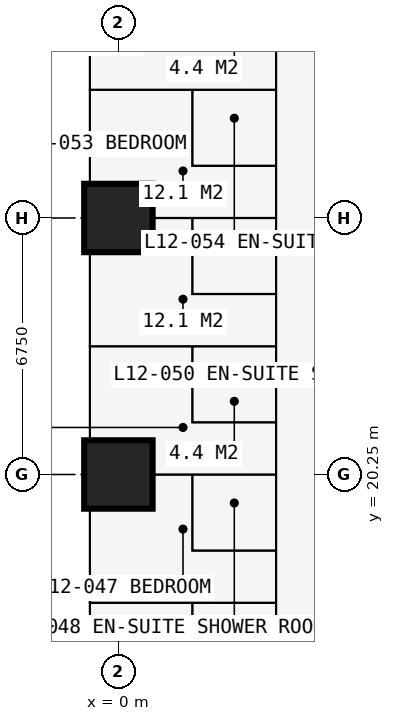
"""IFC4 building model, lengths in metres.
Left out: names, types, materials, properties, quantities, classifications, styles, units other than length and angle.
Written with IfcOpenShell. Run it as: python <this file> out.ifc"""

import sys

from ifc_helpers import new_model, si_unit, direction, frame, frame_2d, origin, origin_2d, place, context, subcontext, project, spatial, rectangle, extrude, element, fill, save


model = new_model("IFC4")
c1 = context("Model", 3, precision=1e-05, world=origin(), true_north=direction((0.0, 1.0)))
c2 = subcontext(c1, "Body", "Model", "MODEL_VIEW")
j1 = project(units=[si_unit("LENGTHUNIT", "METRE"), si_unit("PLANEANGLEUNIT", "RADIAN")], contexts=[c1])
p1 = place(None, origin())
s1 = spatial("IfcSite", under=j1, at=p1, CompositionType="ELEMENT")
p2 = place(p1, origin())
s2 = spatial("IfcBuilding", under=s1, at=p2, CompositionType="ELEMENT")
p3 = place(p2, frame((0.0, 0.0, 46.8)))
s3 = spatial("IfcBuildingStorey", under=s2, at=p3, CompositionType="ELEMENT", Elevation=46.8)
for number, where, z_axis, x_axis in (
    (1, (0.0, 20.25, 0.0), (0.0, 0.0, 1.0), (1.0, 0.0, 0.0)),
    (2, (0.0, 27.0, 0.0), (0.0, 0.0, 1.0), (1.0, 0.0, 0.0)),
):
    element("IfcColumn", number, at=place(p3, frame(where, z_axis=z_axis, x_axis=x_axis)), inside=s3, PredefinedType="COLUMN", context=c2, shape_type="SweptSolid", body=[
        extrude(rectangle(XDim=1.8, YDim=1.8, at=origin_2d()), origin(), (0.0, 0.0, 1.0), 3.6),
    ])
p4 = place(p3, frame((-0.75, 13.5, 0.0), z_axis=(0.0, 0.0, 1.0), x_axis=(0.0, 1.0, 0.0)))
e3 = element("IfcWall", 3, at=p4, inside=s3, PredefinedType="SOLIDWALL", context=c2, shape_type="SweptSolid", body=[
    extrude(rectangle(XDim=6.75, YDim=0.15, at=frame_2d((3.375, 0.0))), origin(), (0.0, 0.0, 1.0), 3.375),
])
p5 = place(p4, frame((0.962, 0.0, 0.0)))
e4 = element("IfcOpeningElement", 4, at=p5, cuts=e3, PredefinedType="OPENING", context=c2, shape_type="SweptSolid", body=[
    extrude(rectangle(XDim=1.0, YDim=2.2, at=frame_2d((0.5, 1.1))), frame((0.0, 0.085, 0.0), z_axis=(0.0, -1.0, 0.0), x_axis=(1.0, 0.0, 0.0)), (0.0, 0.0, 1.0), 0.17),
])
p6 = place(p4, frame((2.025, 0.0, 0.9)))
e5 = element("IfcOpeningElement", 5, at=p6, cuts=e3, PredefinedType="OPENING", context=c2, shape_type="SweptSolid", body=[
    extrude(rectangle(XDim=1.2, YDim=1.8, at=frame_2d((0.6, 0.9))), frame((0.0, 0.085, 0.0), z_axis=(0.0, -1.0, 0.0), x_axis=(1.0, 0.0, 0.0)), (0.0, 0.0, 1.0), 0.17),
])
p7 = place(p4, frame((4.788, 0.0, 0.0)))
e6 = element("IfcOpeningElement", 6, at=p7, cuts=e3, PredefinedType="OPENING", context=c2, shape_type="SweptSolid", body=[
    extrude(rectangle(XDim=1.0, YDim=2.2, at=frame_2d((0.5, 1.1))), frame((0.0, 0.085, 0.0), z_axis=(0.0, -1.0, 0.0), x_axis=(1.0, 0.0, 0.0)), (0.0, 0.0, 1.0), 0.17),
])
p8 = place(p4, frame((3.525, 0.0, 0.9)))
e7 = element("IfcOpeningElement", 7, at=p8, cuts=e3, PredefinedType="OPENING", context=c2, shape_type="SweptSolid", body=[
    extrude(rectangle(XDim=1.2, YDim=1.8, at=frame_2d((0.6, 0.9))), frame((0.0, 0.085, 0.0), z_axis=(0.0, -1.0, 0.0), x_axis=(1.0, 0.0, 0.0)), (0.0, 0.0, 1.0), 0.17),
])
p9 = place(p3, frame((-0.75, 20.25, 0.0), z_axis=(0.0, 0.0, 1.0), x_axis=(0.0, 1.0, 0.0)))
e8 = element("IfcWall", 8, at=p9, inside=s3, PredefinedType="SOLIDWALL", context=c2, shape_type="SweptSolid", body=[
    extrude(rectangle(XDim=6.75, YDim=0.15, at=frame_2d((3.375, 0.0))), origin(), (0.0, 0.0, 1.0), 3.375),
])
p10 = place(p9, frame((0.962, 0.0, 0.0)))
e9 = element("IfcOpeningElement", 9, at=p10, cuts=e8, PredefinedType="OPENING", context=c2, shape_type="SweptSolid", body=[
    extrude(rectangle(XDim=1.0, YDim=2.2, at=frame_2d((0.5, 1.1))), frame((0.0, 0.085, 0.0), z_axis=(0.0, -1.0, 0.0), x_axis=(1.0, 0.0, 0.0)), (0.0, 0.0, 1.0), 0.17),
])
p11 = place(p9, frame((2.025, 0.0, 0.9)))
e10 = element("IfcOpeningElement", 10, at=p11, cuts=e8, PredefinedType="OPENING", context=c2, shape_type="SweptSolid", body=[
    extrude(rectangle(XDim=1.2, YDim=1.8, at=frame_2d((0.6, 0.9))), frame((0.0, 0.085, 0.0), z_axis=(0.0, -1.0, 0.0), x_axis=(1.0, 0.0, 0.0)), (0.0, 0.0, 1.0), 0.17),
])
p12 = place(p9, frame((4.788, 0.0, 0.0)))
e11 = element("IfcOpeningElement", 11, at=p12, cuts=e8, PredefinedType="OPENING", context=c2, shape_type="SweptSolid", body=[
    extrude(rectangle(XDim=1.0, YDim=2.2, at=frame_2d((0.5, 1.1))), frame((0.0, 0.085, 0.0), z_axis=(0.0, -1.0, 0.0), x_axis=(1.0, 0.0, 0.0)), (0.0, 0.0, 1.0), 0.17),
])
p13 = place(p9, frame((3.525, 0.0, 0.9)))
e12 = element("IfcOpeningElement", 12, at=p13, cuts=e8, PredefinedType="OPENING", context=c2, shape_type="SweptSolid", body=[
    extrude(rectangle(XDim=1.2, YDim=1.8, at=frame_2d((0.6, 0.9))), frame((0.0, 0.085, 0.0), z_axis=(0.0, -1.0, 0.0), x_axis=(1.0, 0.0, 0.0)), (0.0, 0.0, 1.0), 0.17),
])
for number, where, z_axis, x_axis in (
    (13, (-0.85, 16.875, 0.0), (0.0, 0.0, 1.0), (-1.0, 0.0, 0.0)),
    (14, (-0.85, 23.625, 0.0), (0.0, 0.0, 1.0), (-1.0, 0.0, 0.0)),
):
    element("IfcWall", number, at=place(p3, frame(where, z_axis=z_axis, x_axis=x_axis)), inside=s3, PredefinedType="USERDEFINED", context=c2, shape_type="SweptSolid", body=[
        extrude(rectangle(XDim=2.2, YDim=1.0, at=frame_2d((1.1, 0.0))), origin(), (0.0, 0.0, 1.0), 0.9),
    ])
p14 = place(p3, frame((-0.734, 16.875, 0.0), z_axis=(0.0, 0.0, 1.0), x_axis=(1.0, 0.0, 0.0)))
e15 = element("IfcWall", 15, at=p14, inside=s3, PredefinedType="PARTITIONING", context=c2, shape_type="SweptSolid", body=[
    extrude(rectangle(XDim=4.884, YDim=0.175, at=frame_2d((2.442, 0.0))), origin(), (0.0, 0.0, 1.0), 3.375),
])
p15 = place(p3, frame((-0.734, 20.25, 0.0), z_axis=(0.0, 0.0, 1.0), x_axis=(1.0, 0.0, 0.0)))
e16 = element("IfcWall", 16, at=p15, inside=s3, PredefinedType="PARTITIONING", context=c2, shape_type="SweptSolid", body=[
    extrude(rectangle(XDim=4.884, YDim=0.175, at=frame_2d((2.442, 0.0))), origin(), (0.0, 0.0, 1.0), 2.61),
])
p16 = place(p3, frame((-0.734, 23.625, 0.0), z_axis=(0.0, 0.0, 1.0), x_axis=(1.0, 0.0, 0.0)))
e17 = element("IfcWall", 17, at=p16, inside=s3, PredefinedType="PARTITIONING", context=c2, shape_type="SweptSolid", body=[
    extrude(rectangle(XDim=4.884, YDim=0.175, at=frame_2d((2.442, 0.0))), origin(), (0.0, 0.0, 1.0), 3.375),
])
p17 = place(p3, frame((-0.734, 27.0, 0.0), z_axis=(0.0, 0.0, 1.0), x_axis=(1.0, 0.0, 0.0)))
e18 = element("IfcWall", 18, at=p17, inside=s3, PredefinedType="PARTITIONING", context=c2, shape_type="SweptSolid", body=[
    extrude(rectangle(XDim=4.884, YDim=0.175, at=frame_2d((2.442, 0.0))), origin(), (0.0, 0.0, 1.0), 2.61),
])
p18 = place(p3, frame((-0.734, 30.375, 0.0), z_axis=(0.0, 0.0, 1.0), x_axis=(1.0, 0.0, 0.0)))
e19 = element("IfcWall", 19, at=p18, inside=s3, PredefinedType="PARTITIONING", context=c2, shape_type="SweptSolid", body=[
    extrude(rectangle(XDim=4.884, YDim=0.175, at=frame_2d((2.442, 0.0))), origin(), (0.0, 0.0, 1.0), 3.375),
])
for number, where, z_axis, x_axis in (
    (20, (1.95, 14.875, 0.0), (0.0, 0.0, 1.0), (0.0, 1.0, 0.0)),
    (21, (1.95, 18.25, 0.0), (0.0, 0.0, 1.0), (0.0, 1.0, 0.0)),
):
    element("IfcWall", number, at=place(p3, frame(where, z_axis=z_axis, x_axis=x_axis)), inside=s3, PredefinedType="PARTITIONING", context=c2, shape_type="SweptSolid", body=[
        extrude(rectangle(XDim=2.0, YDim=0.1, at=frame_2d((1.0, 0.0))), origin(), (0.0, 0.0, 1.0), 3.375),
    ])
p19 = place(p3, frame((1.95, 18.25, 0.0), z_axis=(0.0, 0.0, 1.0), x_axis=(1.0, 0.0, 0.0)))
e22 = element("IfcWall", 22, at=p19, inside=s3, PredefinedType="PARTITIONING", context=c2, shape_type="SweptSolid", body=[
    extrude(rectangle(XDim=2.2, YDim=0.1, at=frame_2d((1.1, 0.0))), origin(), (0.0, 0.0, 1.0), 3.375),
])
p20 = place(p19, frame((0.65, 0.0, 0.0)))
e23 = element("IfcOpeningElement", 23, at=p20, cuts=e22, PredefinedType="OPENING", context=c2, shape_type="SweptSolid", body=[
    extrude(rectangle(XDim=0.9, YDim=2.2, at=frame_2d((0.45, 1.1))), frame((0.0, 0.06, 0.0), z_axis=(0.0, -1.0, 0.0), x_axis=(1.0, 0.0, 0.0)), (0.0, 0.0, 1.0), 0.12),
])
p21 = place(p3, frame((1.95, 21.625, 0.0), z_axis=(0.0, 0.0, 1.0), x_axis=(0.0, 1.0, 0.0)))
e24 = element("IfcWall", 24, at=p21, inside=s3, PredefinedType="PARTITIONING", context=c2, shape_type="SweptSolid", body=[
    extrude(rectangle(XDim=2.0, YDim=0.1, at=frame_2d((1.0, 0.0))), origin(), (0.0, 0.0, 1.0), 3.375),
])
p22 = place(p3, frame((1.95, 21.625, 0.0), z_axis=(0.0, 0.0, 1.0), x_axis=(1.0, 0.0, 0.0)))
e25 = element("IfcWall", 25, at=p22, inside=s3, PredefinedType="PARTITIONING", context=c2, shape_type="SweptSolid", body=[
    extrude(rectangle(XDim=2.2, YDim=0.1, at=frame_2d((1.1, 0.0))), origin(), (0.0, 0.0, 1.0), 3.375),
])
p23 = place(p22, frame((0.65, 0.0, 0.0)))
e26 = element("IfcOpeningElement", 26, at=p23, cuts=e25, PredefinedType="OPENING", context=c2, shape_type="SweptSolid", body=[
    extrude(rectangle(XDim=0.9, YDim=2.2, at=frame_2d((0.45, 1.1))), frame((0.0, 0.06, 0.0), z_axis=(0.0, -1.0, 0.0), x_axis=(1.0, 0.0, 0.0)), (0.0, 0.0, 1.0), 0.12),
])
p24 = place(p3, frame((1.95, 25.0, 0.0), z_axis=(0.0, 0.0, 1.0), x_axis=(0.0, 1.0, 0.0)))
e27 = element("IfcWall", 27, at=p24, inside=s3, PredefinedType="PARTITIONING", context=c2, shape_type="SweptSolid", body=[
    extrude(rectangle(XDim=2.0, YDim=0.1, at=frame_2d((1.0, 0.0))), origin(), (0.0, 0.0, 1.0), 3.375),
])
p25 = place(p3, frame((1.95, 25.0, 0.0), z_axis=(0.0, 0.0, 1.0), x_axis=(1.0, 0.0, 0.0)))
e28 = element("IfcWall", 28, at=p25, inside=s3, PredefinedType="PARTITIONING", context=c2, shape_type="SweptSolid", body=[
    extrude(rectangle(XDim=2.2, YDim=0.1, at=frame_2d((1.1, 0.0))), origin(), (0.0, 0.0, 1.0), 3.375),
])
p26 = place(p25, frame((0.65, 0.0, 0.0)))
e29 = element("IfcOpeningElement", 29, at=p26, cuts=e28, PredefinedType="OPENING", context=c2, shape_type="SweptSolid", body=[
    extrude(rectangle(XDim=0.9, YDim=2.2, at=frame_2d((0.45, 1.1))), frame((0.0, 0.06, 0.0), z_axis=(0.0, -1.0, 0.0), x_axis=(1.0, 0.0, 0.0)), (0.0, 0.0, 1.0), 0.12),
])
p27 = place(p3, frame((1.95, 28.375, 0.0), z_axis=(0.0, 0.0, 1.0), x_axis=(0.0, 1.0, 0.0)))
e30 = element("IfcWall", 30, at=p27, inside=s3, PredefinedType="PARTITIONING", context=c2, shape_type="SweptSolid", body=[
    extrude(rectangle(XDim=2.0, YDim=0.1, at=frame_2d((1.0, 0.0))), origin(), (0.0, 0.0, 1.0), 3.375),
])
p28 = place(p3, frame((1.95, 28.375, 0.0), z_axis=(0.0, 0.0, 1.0), x_axis=(1.0, 0.0, 0.0)))
e31 = element("IfcWall", 31, at=p28, inside=s3, PredefinedType="PARTITIONING", context=c2, shape_type="SweptSolid", body=[
    extrude(rectangle(XDim=2.2, YDim=0.1, at=frame_2d((1.1, 0.0))), origin(), (0.0, 0.0, 1.0), 3.375),
])
p29 = place(p28, frame((0.65, 0.0, 0.0)))
e32 = element("IfcOpeningElement", 32, at=p29, cuts=e31, PredefinedType="OPENING", context=c2, shape_type="SweptSolid", body=[
    extrude(rectangle(XDim=0.9, YDim=2.2, at=frame_2d((0.45, 1.1))), frame((0.0, 0.06, 0.0), z_axis=(0.0, -1.0, 0.0), x_axis=(1.0, 0.0, 0.0)), (0.0, 0.0, 1.0), 0.12),
])
p30 = place(p3, frame((4.15, 10.125, 0.0), z_axis=(0.0, 0.0, 1.0), x_axis=(0.0, 1.0, 0.0)))
e33 = element("IfcWall", 33, at=p30, inside=s3, PredefinedType="PARTITIONING", context=c2, shape_type="SweptSolid", body=[
    extrude(rectangle(XDim=23.625, YDim=0.1, at=frame_2d((11.812, 0.0))), origin(), (0.0, 0.0, 1.0), 3.375),
])
p31 = place(p30, frame((0.2, 0.0, 0.0)))
e34 = element("IfcOpeningElement", 34, at=p31, cuts=e33, PredefinedType="OPENING", context=c2, shape_type="SweptSolid", body=[
    extrude(rectangle(XDim=0.95, YDim=2.2, at=frame_2d((0.475, 1.1))), frame((0.0, 0.06, 0.0), z_axis=(0.0, -1.0, 0.0), x_axis=(1.0, 0.0, 0.0)), (0.0, 0.0, 1.0), 0.12),
])
p32 = place(p30, frame((3.625, 0.0, 0.0)))
e35 = element("IfcOpeningElement", 35, at=p32, cuts=e33, PredefinedType="OPENING", context=c2, shape_type="SweptSolid", body=[
    extrude(rectangle(XDim=0.95, YDim=2.2, at=frame_2d((0.475, 1.1))), frame((0.0, 0.06, 0.0), z_axis=(0.0, -1.0, 0.0), x_axis=(1.0, 0.0, 0.0)), (0.0, 0.0, 1.0), 0.12),
])
p33 = place(p30, frame((7.0, 0.0, 0.0)))
e36 = element("IfcOpeningElement", 36, at=p33, cuts=e33, PredefinedType="OPENING", context=c2, shape_type="SweptSolid", body=[
    extrude(rectangle(XDim=0.95, YDim=2.2, at=frame_2d((0.475, 1.1))), frame((0.0, 0.06, 0.0), z_axis=(0.0, -1.0, 0.0), x_axis=(1.0, 0.0, 0.0)), (0.0, 0.0, 1.0), 0.12),
])
p34 = place(p30, frame((10.375, 0.0, 0.0)))
e37 = element("IfcOpeningElement", 37, at=p34, cuts=e33, PredefinedType="OPENING", context=c2, shape_type="SweptSolid", body=[
    extrude(rectangle(XDim=0.95, YDim=2.2, at=frame_2d((0.475, 1.1))), frame((0.0, 0.06, 0.0), z_axis=(0.0, -1.0, 0.0), x_axis=(1.0, 0.0, 0.0)), (0.0, 0.0, 1.0), 0.12),
])
p35 = place(p30, frame((13.75, 0.0, 0.0)))
e38 = element("IfcOpeningElement", 38, at=p35, cuts=e33, PredefinedType="OPENING", context=c2, shape_type="SweptSolid", body=[
    extrude(rectangle(XDim=0.95, YDim=2.2, at=frame_2d((0.475, 1.1))), frame((0.0, 0.06, 0.0), z_axis=(0.0, -1.0, 0.0), x_axis=(1.0, 0.0, 0.0)), (0.0, 0.0, 1.0), 0.12),
])
p36 = place(p30, frame((17.125, 0.0, 0.0)))
e39 = element("IfcOpeningElement", 39, at=p36, cuts=e33, PredefinedType="OPENING", context=c2, shape_type="SweptSolid", body=[
    extrude(rectangle(XDim=0.95, YDim=2.2, at=frame_2d((0.475, 1.1))), frame((0.0, 0.06, 0.0), z_axis=(0.0, -1.0, 0.0), x_axis=(1.0, 0.0, 0.0)), (0.0, 0.0, 1.0), 0.12),
])
p37 = place(p30, frame((20.5, 0.0, 0.0)))
e40 = element("IfcOpeningElement", 40, at=p37, cuts=e33, PredefinedType="OPENING", context=c2, shape_type="SweptSolid", body=[
    extrude(rectangle(XDim=0.95, YDim=2.2, at=frame_2d((0.475, 1.1))), frame((0.0, 0.06, 0.0), z_axis=(0.0, -1.0, 0.0), x_axis=(1.0, 0.0, 0.0)), (0.0, 0.0, 1.0), 0.12),
])
p38 = place(p6, origin())
e41 = element("IfcWindow", 41, at=p38, inside=s3, PartitioningType="SINGLE_PANEL", PredefinedType="WINDOW", context=c2, shape_type="SweptSolid", body=[
    extrude(rectangle(XDim=1.2, YDim=1.8, at=frame_2d((0.6, 0.9))), frame((0.0, 0.03, 0.0), z_axis=(0.0, -1.0, 0.0), x_axis=(1.0, 0.0, 0.0)), (0.0, 0.0, 1.0), 0.06),
])
fill(e5, e41)
p39 = place(p7, origin())
e42 = element("IfcDoor", 42, at=p39, inside=s3, OperationType="SINGLE_SWING_RIGHT", PredefinedType="DOOR", context=c2, shape_type="SweptSolid", body=[
    extrude(rectangle(XDim=1.0, YDim=2.2, at=frame_2d((0.5, 1.1))), frame((0.0, 0.025, 0.0), z_axis=(0.0, -1.0, 0.0), x_axis=(1.0, 0.0, 0.0)), (0.0, 0.0, 1.0), 0.05),
])
fill(e6, e42)
p40 = place(p8, origin())
e43 = element("IfcWindow", 43, at=p40, inside=s3, PartitioningType="SINGLE_PANEL", PredefinedType="WINDOW", context=c2, shape_type="SweptSolid", body=[
    extrude(rectangle(XDim=1.2, YDim=1.8, at=frame_2d((0.6, 0.9))), frame((0.0, 0.03, 0.0), z_axis=(0.0, -1.0, 0.0), x_axis=(1.0, 0.0, 0.0)), (0.0, 0.0, 1.0), 0.06),
])
fill(e7, e43)
p41 = place(p10, origin())
e44 = element("IfcDoor", 44, at=p41, inside=s3, OperationType="SINGLE_SWING_LEFT", PredefinedType="DOOR", context=c2, shape_type="SweptSolid", body=[
    extrude(rectangle(XDim=1.0, YDim=2.2, at=frame_2d((0.5, 1.1))), frame((0.0, 0.025, 0.0), z_axis=(0.0, -1.0, 0.0), x_axis=(1.0, 0.0, 0.0)), (0.0, 0.0, 1.0), 0.05),
])
fill(e9, e44)
p42 = place(p11, origin())
e45 = element("IfcWindow", 45, at=p42, inside=s3, PartitioningType="SINGLE_PANEL", PredefinedType="WINDOW", context=c2, shape_type="SweptSolid", body=[
    extrude(rectangle(XDim=1.2, YDim=1.8, at=frame_2d((0.6, 0.9))), frame((0.0, 0.03, 0.0), z_axis=(0.0, -1.0, 0.0), x_axis=(1.0, 0.0, 0.0)), (0.0, 0.0, 1.0), 0.06),
])
fill(e10, e45)
p43 = place(p12, origin())
e46 = element("IfcDoor", 46, at=p43, inside=s3, OperationType="SINGLE_SWING_RIGHT", PredefinedType="DOOR", context=c2, shape_type="SweptSolid", body=[
    extrude(rectangle(XDim=1.0, YDim=2.2, at=frame_2d((0.5, 1.1))), frame((0.0, 0.025, 0.0), z_axis=(0.0, -1.0, 0.0), x_axis=(1.0, 0.0, 0.0)), (0.0, 0.0, 1.0), 0.05),
])
fill(e11, e46)
p44 = place(p13, origin())
e47 = element("IfcWindow", 47, at=p44, inside=s3, PartitioningType="SINGLE_PANEL", PredefinedType="WINDOW", context=c2, shape_type="SweptSolid", body=[
    extrude(rectangle(XDim=1.2, YDim=1.8, at=frame_2d((0.6, 0.9))), frame((0.0, 0.03, 0.0), z_axis=(0.0, -1.0, 0.0), x_axis=(1.0, 0.0, 0.0)), (0.0, 0.0, 1.0), 0.06),
])
fill(e12, e47)
p45 = place(p33, origin())
e48 = element("IfcDoor", 48, at=p45, inside=s3, OperationType="SINGLE_SWING_LEFT", PredefinedType="DOOR", context=c2, shape_type="SweptSolid", body=[
    extrude(rectangle(XDim=0.95, YDim=2.2, at=frame_2d((0.475, 1.1))), frame((0.0, 0.025, 0.0), z_axis=(0.0, -1.0, 0.0), x_axis=(1.0, 0.0, 0.0)), (0.0, 0.0, 1.0), 0.05),
])
fill(e36, e48)
p46 = place(p20, origin())
e49 = element("IfcDoor", 49, at=p46, inside=s3, OperationType="SINGLE_SWING_RIGHT", PredefinedType="DOOR", context=c2, shape_type="SweptSolid", body=[
    extrude(rectangle(XDim=0.9, YDim=2.2, at=frame_2d((0.45, 1.1))), frame((0.0, 0.025, 0.0), z_axis=(0.0, -1.0, 0.0), x_axis=(1.0, 0.0, 0.0)), (0.0, 0.0, 1.0), 0.05),
])
fill(e23, e49)
p47 = place(p34, origin())
e50 = element("IfcDoor", 50, at=p47, inside=s3, OperationType="SINGLE_SWING_LEFT", PredefinedType="DOOR", context=c2, shape_type="SweptSolid", body=[
    extrude(rectangle(XDim=0.95, YDim=2.2, at=frame_2d((0.475, 1.1))), frame((0.0, 0.025, 0.0), z_axis=(0.0, -1.0, 0.0), x_axis=(1.0, 0.0, 0.0)), (0.0, 0.0, 1.0), 0.05),
])
fill(e37, e50)
p48 = place(p23, origin())
e51 = element("IfcDoor", 51, at=p48, inside=s3, OperationType="SINGLE_SWING_RIGHT", PredefinedType="DOOR", context=c2, shape_type="SweptSolid", body=[
    extrude(rectangle(XDim=0.9, YDim=2.2, at=frame_2d((0.45, 1.1))), frame((0.0, 0.025, 0.0), z_axis=(0.0, -1.0, 0.0), x_axis=(1.0, 0.0, 0.0)), (0.0, 0.0, 1.0), 0.05),
])
fill(e26, e51)
p49 = place(p35, origin())
e52 = element("IfcDoor", 52, at=p49, inside=s3, OperationType="SINGLE_SWING_LEFT", PredefinedType="DOOR", context=c2, shape_type="SweptSolid", body=[
    extrude(rectangle(XDim=0.95, YDim=2.2, at=frame_2d((0.475, 1.1))), frame((0.0, 0.025, 0.0), z_axis=(0.0, -1.0, 0.0), x_axis=(1.0, 0.0, 0.0)), (0.0, 0.0, 1.0), 0.05),
])
fill(e38, e52)
p50 = place(p26, origin())
e53 = element("IfcDoor", 53, at=p50, inside=s3, OperationType="SINGLE_SWING_RIGHT", PredefinedType="DOOR", context=c2, shape_type="SweptSolid", body=[
    extrude(rectangle(XDim=0.9, YDim=2.2, at=frame_2d((0.45, 1.1))), frame((0.0, 0.025, 0.0), z_axis=(0.0, -1.0, 0.0), x_axis=(1.0, 0.0, 0.0)), (0.0, 0.0, 1.0), 0.05),
])
fill(e29, e53)
p51 = place(p36, origin())
e54 = element("IfcDoor", 54, at=p51, inside=s3, OperationType="SINGLE_SWING_LEFT", PredefinedType="DOOR", context=c2, shape_type="SweptSolid", body=[
    extrude(rectangle(XDim=0.95, YDim=2.2, at=frame_2d((0.475, 1.1))), frame((0.0, 0.025, 0.0), z_axis=(0.0, -1.0, 0.0), x_axis=(1.0, 0.0, 0.0)), (0.0, 0.0, 1.0), 0.05),
])
fill(e39, e54)
p52 = place(p29, origin())
e55 = element("IfcDoor", 55, at=p52, inside=s3, OperationType="SINGLE_SWING_RIGHT", PredefinedType="DOOR", context=c2, shape_type="SweptSolid", body=[
    extrude(rectangle(XDim=0.9, YDim=2.2, at=frame_2d((0.45, 1.1))), frame((0.0, 0.025, 0.0), z_axis=(0.0, -1.0, 0.0), x_axis=(1.0, 0.0, 0.0)), (0.0, 0.0, 1.0), 0.05),
])
fill(e32, e55)
p53 = place(p37, origin())
e56 = element("IfcDoor", 56, at=p53, inside=s3, OperationType="SINGLE_SWING_LEFT", PredefinedType="DOOR", context=c2, shape_type="SweptSolid", body=[
    extrude(rectangle(XDim=0.95, YDim=2.2, at=frame_2d((0.475, 1.1))), frame((0.0, 0.025, 0.0), z_axis=(0.0, -1.0, 0.0), x_axis=(1.0, 0.0, 0.0)), (0.0, 0.0, 1.0), 0.05),
])
fill(e40, e56)
save(model, sys.argv[1])
